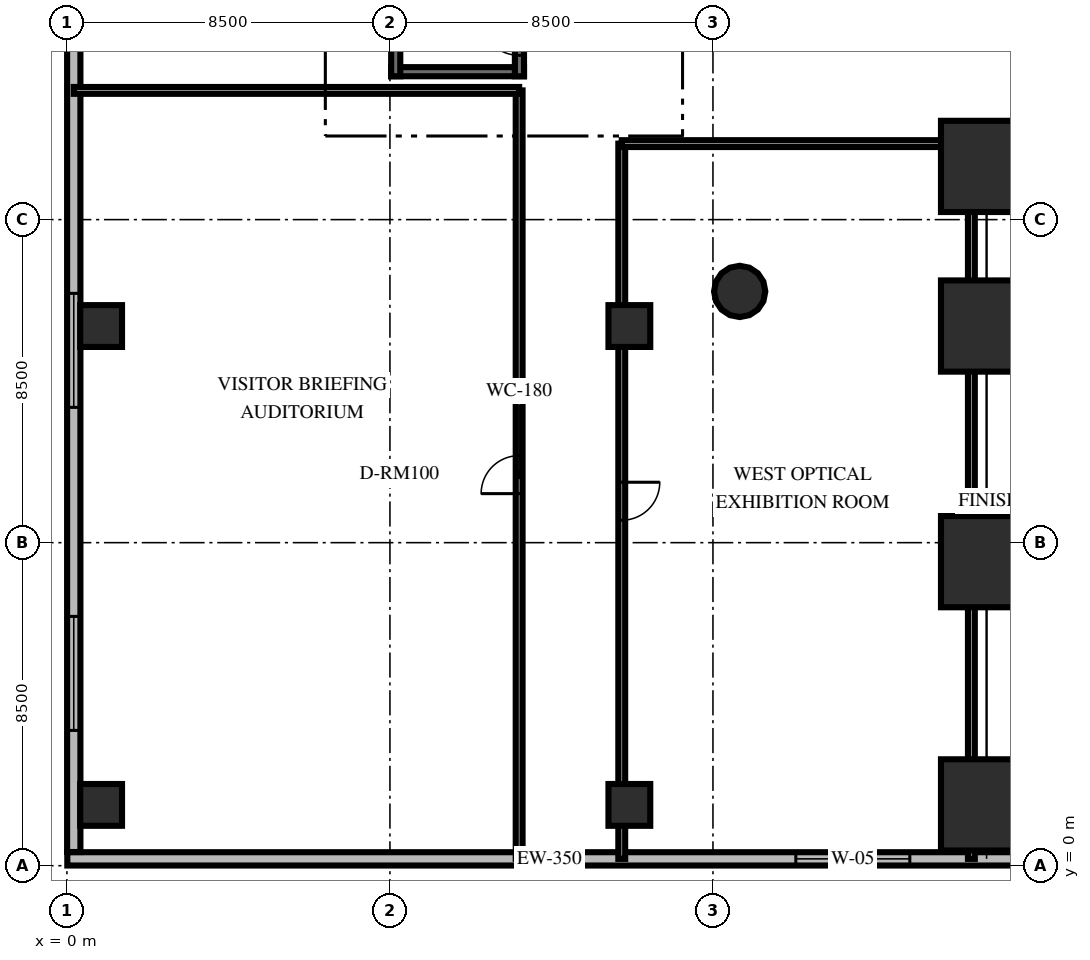
"""IFC4 building model, lengths in metres.
Left out: names, types, materials, properties, quantities, classifications, styles, units other than length and angle.
Written with IfcOpenShell. Run it as: python <this file> out.ifc"""

import sys

from ifc_helpers import new_model, si_unit, direction, frame, frame_2d, origin, origin_2d, place, context, subcontext, project, spatial, rectangle, circle, extrude, element, fill, save


model = new_model("IFC4")
c1 = context("Model", 3, precision=1e-05, world=origin(), true_north=direction((0.0, 1.0)))
c2 = subcontext(c1, "Body", "Model", "MODEL_VIEW")
j1 = project(units=[si_unit("LENGTHUNIT", "METRE"), si_unit("PLANEANGLEUNIT", "RADIAN")], contexts=[c1])
p1 = place(None, origin())
s1 = spatial("IfcSite", under=j1, at=p1, CompositionType="ELEMENT")
p2 = place(p1, origin())
s2 = spatial("IfcBuilding", under=s1, at=p2, CompositionType="ELEMENT")
p3 = place(p2, frame((0.0, 0.0, 5.4)))
s3 = spatial("IfcBuildingStorey", under=s2, at=p3, CompositionType="ELEMENT", Elevation=5.4)
p4 = place(p3, frame((8.532, 20.892, 0.0), z_axis=(0.0, 0.0, 1.0), x_axis=(1.0, 0.0, 0.0)))
e1 = element("IfcWall", 1, at=p4, inside=s3, PredefinedType="SHEAR", context=c2, shape_type="SweptSolid", body=[
    extrude(rectangle(XDim=3.496, YDim=0.24, at=frame_2d((1.748, 0.0))), origin(), (0.0, 0.0, 1.0), 4.8),
])
p5 = place(p3, frame((8.652, 20.772, 0.0), z_axis=(0.0, 0.0, 1.0), x_axis=(0.0, 1.0, 0.0)))
e2 = element("IfcWall", 2, at=p5, inside=s3, PredefinedType="SHEAR", context=c2, shape_type="SweptSolid", body=[
    extrude(rectangle(XDim=9.556, YDim=0.24, at=frame_2d((4.778, 0.0))), origin(), (0.0, 0.0, 1.0), 4.8),
])
p6 = place(p3, frame((11.908, 20.772, 0.0), z_axis=(0.0, 0.0, 1.0), x_axis=(0.0, 1.0, 0.0)))
e3 = element("IfcWall", 3, at=p6, inside=s3, PredefinedType="SHEAR", context=c2, shape_type="SweptSolid", body=[
    extrude(rectangle(XDim=9.556, YDim=0.24, at=frame_2d((4.778, 0.0))), origin(), (0.0, 0.0, 1.0), 4.8),
])
p7 = place(p6, frame((0.55, 0.0, 0.0)))
e4 = element("IfcOpeningElement", 4, at=p7, cuts=e3, PredefinedType="OPENING", context=c2, shape_type="SweptSolid", body=[
    extrude(rectangle(XDim=1.05, YDim=2.15, at=frame_2d((0.525, 1.075))), frame((0.0, 0.13, 0.0), z_axis=(0.0, -1.0, 0.0), x_axis=(1.0, 0.0, 0.0)), (0.0, 0.0, 1.0), 0.26),
])
for number, where, z_axis, x_axis in (
    (5, (24.2, 1.6, 0.0), (0.0, 0.0, 1.0), (1.0, 0.0, 0.0)),
    (6, (24.2, 8.0, 0.0), (0.0, 0.0, 1.0), (1.0, 0.0, 0.0)),
    (7, (24.2, 14.2, 0.0), (0.0, 0.0, 1.0), (1.0, 0.0, 0.0)),
    (8, (24.2, 18.4, 0.0), (0.0, 0.0, 1.0), (1.0, 0.0, 0.0)),
):
    element("IfcColumn", number, at=place(p3, frame(where, z_axis=z_axis, x_axis=x_axis)), inside=s3, PredefinedType="USERDEFINED", context=c2, shape_type="SweptSolid", body=[
        extrude(rectangle(XDim=2.4, YDim=2.4, at=origin_2d()), origin(), (0.0, 0.0, 1.0), 4.8),
    ])
for number, where, z_axis, x_axis in (
    (9, (0.9, 1.6, 0.0), (0.0, 0.0, 1.0), (1.0, 0.0, 0.0)),
    (10, (0.9, 14.2, 0.0), (0.0, 0.0, 1.0), (1.0, 0.0, 0.0)),
    (11, (14.8, 1.6, 0.0), (0.0, 0.0, 1.0), (1.0, 0.0, 0.0)),
    (12, (14.8, 14.2, 0.0), (0.0, 0.0, 1.0), (1.0, 0.0, 0.0)),
):
    element("IfcColumn", number, at=place(p3, frame(where, z_axis=z_axis, x_axis=x_axis)), inside=s3, PredefinedType="COLUMN", context=c2, shape_type="SweptSolid", body=[
        extrude(rectangle(XDim=1.1, YDim=1.1, at=origin_2d()), origin(), (0.0, 0.0, 1.0), 4.8),
    ])
p8 = place(p3, frame((17.703, 15.111, 0.0), z_axis=(0.0, 0.0, 1.0), x_axis=(1.0, 0.0, 0.0)))
e13 = element("IfcColumn", 13, at=p8, inside=s3, PredefinedType="COLUMN", context=c2, shape_type="SweptSolid", body=[
    extrude(circle(Radius=0.675, at=origin_2d()), origin(), (0.0, 0.0, 1.0), 4.8),
])
p9 = place(p3, frame((25.38, 0.18, 0.0), z_axis=(0.0, 0.0, 1.0), x_axis=(-1.0, 0.0, 0.0)))
e14 = element("IfcWall", 14, at=p9, inside=s3, PredefinedType="SOLIDWALL", context=c2, shape_type="SweptSolid", body=[
    extrude(rectangle(XDim=25.37, YDim=0.35, at=frame_2d((12.685, 0.0))), origin(), (0.0, 0.0, 1.0), 3.76),
])
p10 = place(p9, frame((3.2, 0.0, 0.85)))
e15 = element("IfcOpeningElement", 15, at=p10, cuts=e14, PredefinedType="OPENING", context=c2, shape_type="SweptSolid", body=[
    extrude(rectangle(XDim=3.0, YDim=2.4, at=frame_2d((1.5, 1.2))), frame((0.0, 0.185, 0.0), z_axis=(0.0, -1.0, 0.0), x_axis=(1.0, 0.0, 0.0)), (0.0, 0.0, 1.0), 0.37),
])
p11 = place(p3, frame((0.18, 0.36, 0.0), z_axis=(0.0, 0.0, 1.0), x_axis=(0.0, 1.0, 0.0)))
e16 = element("IfcWall", 16, at=p11, inside=s3, PredefinedType="SOLIDWALL", context=c2, shape_type="SweptSolid", body=[
    extrude(rectangle(XDim=51.28, YDim=0.35, at=frame_2d((25.64, 0.0))), origin(), (0.0, 0.0, 1.0), 3.76),
])
p12 = place(p11, frame((3.2, 0.0, 0.85)))
e17 = element("IfcOpeningElement", 17, at=p12, cuts=e16, PredefinedType="OPENING", context=c2, shape_type="SweptSolid", body=[
    extrude(rectangle(XDim=3.0, YDim=2.4, at=frame_2d((1.5, 1.2))), frame((0.0, 0.185, 0.0), z_axis=(0.0, -1.0, 0.0), x_axis=(1.0, 0.0, 0.0)), (0.0, 0.0, 1.0), 0.37),
])
p13 = place(p11, frame((11.7, 0.0, 0.85)))
e18 = element("IfcOpeningElement", 18, at=p13, cuts=e16, PredefinedType="OPENING", context=c2, shape_type="SweptSolid", body=[
    extrude(rectangle(XDim=3.0, YDim=2.4, at=frame_2d((1.5, 1.2))), frame((0.0, 0.185, 0.0), z_axis=(0.0, -1.0, 0.0), x_axis=(1.0, 0.0, 0.0)), (0.0, 0.0, 1.0), 0.37),
])
p14 = place(p11, frame((22.05, 0.0, 0.85)))
e19 = element("IfcOpeningElement", 19, at=p14, cuts=e16, PredefinedType="OPENING", context=c2, shape_type="SweptSolid", body=[
    extrude(rectangle(XDim=3.0, YDim=2.4, at=frame_2d((1.5, 1.2))), frame((0.0, 0.185, 0.0), z_axis=(0.0, -1.0, 0.0), x_axis=(1.0, 0.0, 0.0)), (0.0, 0.0, 1.0), 0.37),
])
p15 = place(p11, frame((37.2, 0.0, 0.85)))
e20 = element("IfcOpeningElement", 20, at=p15, cuts=e16, PredefinedType="OPENING", context=c2, shape_type="SweptSolid", body=[
    extrude(rectangle(XDim=3.0, YDim=2.4, at=frame_2d((1.5, 1.2))), frame((0.0, 0.185, 0.0), z_axis=(0.0, -1.0, 0.0), x_axis=(1.0, 0.0, 0.0)), (0.0, 0.0, 1.0), 0.37),
])
p16 = place(p3, frame((11.9, 0.18, 0.0), z_axis=(0.0, 0.0, 1.0), x_axis=(0.0, 1.0, 0.0)))
e21 = element("IfcWall", 21, at=p16, inside=s3, PredefinedType="PARTITIONING", context=c2, shape_type="SweptSolid", body=[
    extrude(rectangle(XDim=20.22, YDim=0.18, at=frame_2d((10.11, 0.0))), origin(), (0.0, 0.0, 1.0), 3.56),
])
p17 = place(p16, frame((9.61, 0.0, 0.0)))
e22 = element("IfcOpeningElement", 22, at=p17, cuts=e21, PredefinedType="OPENING", context=c2, shape_type="SweptSolid", body=[
    extrude(rectangle(XDim=1.0, YDim=2.15, at=frame_2d((0.5, 1.075))), frame((0.0, 0.1, 0.0), z_axis=(0.0, -1.0, 0.0), x_axis=(1.0, 0.0, 0.0)), (0.0, 0.0, 1.0), 0.2),
])
p18 = place(p3, frame((11.9, 20.4, 0.0), z_axis=(0.0, 0.0, 1.0), x_axis=(-1.0, 0.0, 0.0)))
e23 = element("IfcWall", 23, at=p18, inside=s3, PredefinedType="PARTITIONING", context=c2, shape_type="SweptSolid", body=[
    extrude(rectangle(XDim=11.72, YDim=0.18, at=frame_2d((5.86, 0.0))), origin(), (0.0, 0.0, 1.0), 3.56),
])
p19 = place(p3, frame((14.6, 19.0, 0.0), z_axis=(0.0, 0.0, 1.0), x_axis=(0.0, -1.0, 0.0)))
e24 = element("IfcWall", 24, at=p19, inside=s3, PredefinedType="PARTITIONING", context=c2, shape_type="SweptSolid", body=[
    extrude(rectangle(XDim=18.82, YDim=0.18, at=frame_2d((9.41, 0.0))), origin(), (0.0, 0.0, 1.0), 3.56),
])
p20 = place(p19, frame((8.91, 0.0, 0.0)))
e25 = element("IfcOpeningElement", 25, at=p20, cuts=e24, PredefinedType="OPENING", context=c2, shape_type="SweptSolid", body=[
    extrude(rectangle(XDim=1.0, YDim=2.15, at=frame_2d((0.5, 1.075))), frame((0.0, 0.1, 0.0), z_axis=(0.0, -1.0, 0.0), x_axis=(1.0, 0.0, 0.0)), (0.0, 0.0, 1.0), 0.2),
])
p21 = place(p3, frame((23.8, 0.18, 0.0), z_axis=(0.0, 0.0, 1.0), x_axis=(0.0, 1.0, 0.0)))
e26 = element("IfcWall", 26, at=p21, inside=s3, PredefinedType="PARTITIONING", context=c2, shape_type="SweptSolid", body=[
    extrude(rectangle(XDim=18.82, YDim=0.18, at=frame_2d((9.41, 0.0))), origin(), (0.0, 0.0, 1.0), 3.56),
])
p22 = place(p3, frame((23.8, 19.0, 0.0), z_axis=(0.0, 0.0, 1.0), x_axis=(-1.0, 0.0, 0.0)))
e27 = element("IfcWall", 27, at=p22, inside=s3, PredefinedType="PARTITIONING", context=c2, shape_type="SweptSolid", body=[
    extrude(rectangle(XDim=9.2, YDim=0.18, at=frame_2d((4.6, 0.0))), origin(), (0.0, 0.0, 1.0), 3.56),
])
p23 = place(p10, origin())
e28 = element("IfcWindow", 28, at=p23, inside=s3, PartitioningType="SINGLE_PANEL", PredefinedType="WINDOW", context=c2, shape_type="SweptSolid", body=[
    extrude(rectangle(XDim=3.0, YDim=2.4, at=frame_2d((1.5, 1.2))), frame((0.0, 0.03, 0.0), z_axis=(0.0, -1.0, 0.0), x_axis=(1.0, 0.0, 0.0)), (0.0, 0.0, 1.0), 0.06),
])
fill(e15, e28)
p24 = place(p12, origin())
e29 = element("IfcWindow", 29, at=p24, inside=s3, PartitioningType="SINGLE_PANEL", PredefinedType="WINDOW", context=c2, shape_type="SweptSolid", body=[
    extrude(rectangle(XDim=3.0, YDim=2.4, at=frame_2d((1.5, 1.2))), frame((0.0, 0.03, 0.0), z_axis=(0.0, -1.0, 0.0), x_axis=(1.0, 0.0, 0.0)), (0.0, 0.0, 1.0), 0.06),
])
fill(e17, e29)
p25 = place(p13, origin())
e30 = element("IfcWindow", 30, at=p25, inside=s3, PartitioningType="SINGLE_PANEL", PredefinedType="WINDOW", context=c2, shape_type="SweptSolid", body=[
    extrude(rectangle(XDim=3.0, YDim=2.4, at=frame_2d((1.5, 1.2))), frame((0.0, 0.03, 0.0), z_axis=(0.0, -1.0, 0.0), x_axis=(1.0, 0.0, 0.0)), (0.0, 0.0, 1.0), 0.06),
])
fill(e18, e30)
p26 = place(p7, origin())
e31 = element("IfcDoor", 31, at=p26, inside=s3, OperationType="SINGLE_SWING_RIGHT", PredefinedType="DOOR", context=c2, shape_type="SweptSolid", body=[
    extrude(rectangle(XDim=1.05, YDim=2.15, at=frame_2d((0.525, 1.075))), frame((0.0, 0.025, 0.0), z_axis=(0.0, -1.0, 0.0), x_axis=(1.0, 0.0, 0.0)), (0.0, 0.0, 1.0), 0.05),
])
fill(e4, e31)
p27 = place(p17, origin())
e32 = element("IfcDoor", 32, at=p27, inside=s3, OperationType="SINGLE_SWING_LEFT", PredefinedType="DOOR", context=c2, shape_type="SweptSolid", body=[
    extrude(rectangle(XDim=1.0, YDim=2.15, at=frame_2d((0.5, 1.075))), frame((0.0, 0.025, 0.0), z_axis=(0.0, -1.0, 0.0), x_axis=(1.0, 0.0, 0.0)), (0.0, 0.0, 1.0), 0.05),
])
fill(e22, e32)
p28 = place(p20, origin())
e33 = element("IfcDoor", 33, at=p28, inside=s3, OperationType="SINGLE_SWING_LEFT", PredefinedType="DOOR", context=c2, shape_type="SweptSolid", body=[
    extrude(rectangle(XDim=1.0, YDim=2.15, at=frame_2d((0.5, 1.075))), frame((0.0, 0.025, 0.0), z_axis=(0.0, -1.0, 0.0), x_axis=(1.0, 0.0, 0.0)), (0.0, 0.0, 1.0), 0.05),
])
fill(e25, e33)
save(model, sys.argv[1])
